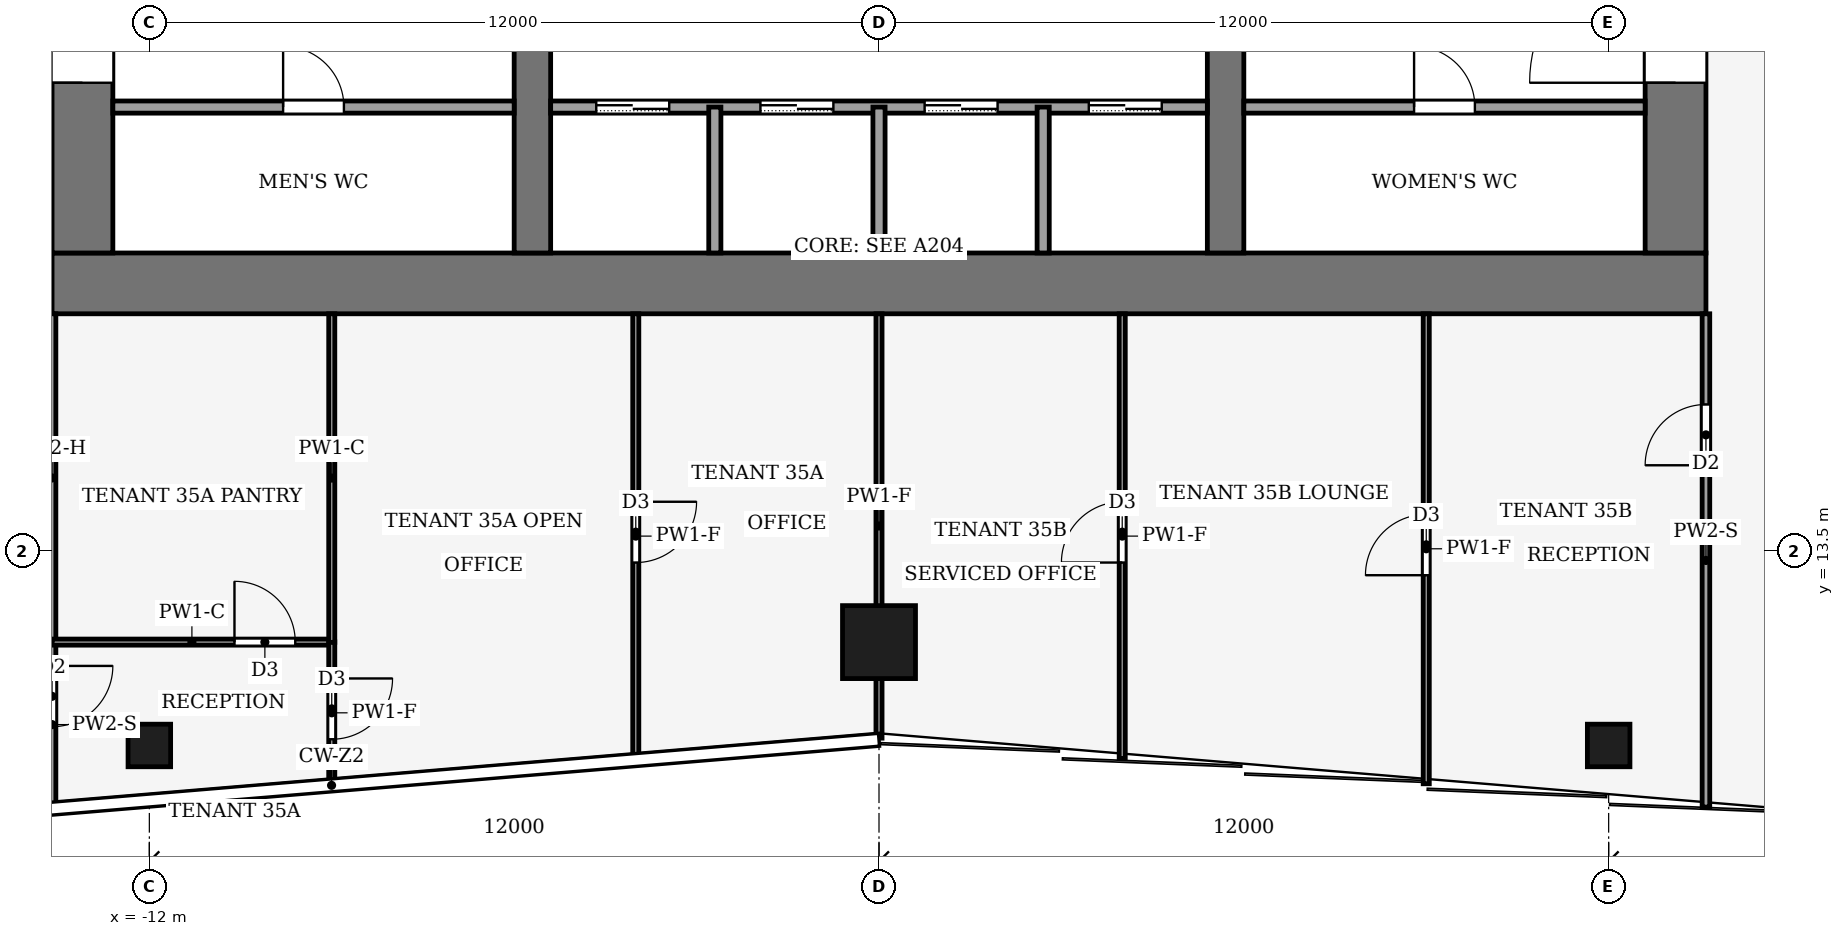
"""IFC4 building model, lengths in metres.
Left out: names, types, materials, properties, quantities, classifications, styles, units other than length and angle.
Written with IfcOpenShell. Run it as: python <this file> out.ifc"""

import sys

from ifc_helpers import new_model, si_unit, direction, frame, frame_2d, origin, origin_2d, place, context, subcontext, project, spatial, rectangle, hollow_rectangle, extrude, element, fill, save


model = new_model("IFC4")
c1 = context("Model", 3, precision=1e-05, world=origin(), true_north=direction((0.0, 1.0)))
c2 = subcontext(c1, "Body", "Model", "MODEL_VIEW")
j1 = project(units=[si_unit("LENGTHUNIT", "METRE"), si_unit("PLANEANGLEUNIT", "RADIAN")], contexts=[c1])
p1 = place(None, origin())
s1 = spatial("IfcSite", under=j1, at=p1, CompositionType="ELEMENT")
p2 = place(p1, origin())
s2 = spatial("IfcBuilding", under=s1, at=p2, CompositionType="ELEMENT")
p3 = place(p2, frame((0.0, 0.0, 154.0)))
s3 = spatial("IfcBuildingStorey", under=s2, at=p3, CompositionType="ELEMENT", Elevation=154.0)
p4 = place(p3, frame((-13.6, 17.9, -0.13), z_axis=(0.0, 0.0, 1.0), x_axis=(1.0, 0.0, 0.0)))
e1 = element("IfcWall", 1, at=p4, inside=s3, PredefinedType="SHEAR", context=c2, shape_type="SweptSolid", body=[
    extrude(rectangle(XDim=27.2, YDim=1.0, at=frame_2d((13.6, 0.0))), origin(), (0.0, 0.0, 1.0), 4.0),
])
p5 = place(p3, frame((-13.1, 18.4, -0.13), z_axis=(0.0, 0.0, 1.0), x_axis=(0.0, 1.0, 0.0)))
e2 = element("IfcWall", 2, at=p5, inside=s3, PredefinedType="SHEAR", context=c2, shape_type="SweptSolid", body=[
    extrude(rectangle(XDim=19.2, YDim=1.0, at=frame_2d((9.6, 0.0))), origin(), (0.0, 0.0, 1.0), 4.0),
])
p6 = place(p5, frame((2.8, 0.0, 0.13)))
e3 = element("IfcOpeningElement", 3, at=p6, cuts=e2, PredefinedType="OPENING", context=c2, shape_type="SweptSolid", body=[
    extrude(rectangle(XDim=2.4, YDim=2.4, at=frame_2d((1.2, 1.2))), frame((0.0, 0.51, 0.0), z_axis=(0.0, -1.0, 0.0), x_axis=(1.0, 0.0, 0.0)), (0.0, 0.0, 1.0), 1.02),
])
p7 = place(p5, frame((13.4, 0.0, 0.13)))
e4 = element("IfcOpeningElement", 4, at=p7, cuts=e2, PredefinedType="OPENING", context=c2, shape_type="SweptSolid", body=[
    extrude(rectangle(XDim=1.4, YDim=2.2, at=frame_2d((0.7, 1.1))), frame((0.0, 0.51, 0.0), z_axis=(0.0, -1.0, 0.0), x_axis=(1.0, 0.0, 0.0)), (0.0, 0.0, 1.0), 1.02),
])
p8 = place(p3, frame((13.1, 18.4, -0.13), z_axis=(0.0, 0.0, 1.0), x_axis=(0.0, 1.0, 0.0)))
e5 = element("IfcWall", 5, at=p8, inside=s3, PredefinedType="SHEAR", context=c2, shape_type="SweptSolid", body=[
    extrude(rectangle(XDim=19.2, YDim=1.0, at=frame_2d((9.6, 0.0))), origin(), (0.0, 0.0, 1.0), 4.0),
])
p9 = place(p8, frame((2.8, 0.0, 0.13)))
e6 = element("IfcOpeningElement", 6, at=p9, cuts=e5, PredefinedType="OPENING", context=c2, shape_type="SweptSolid", body=[
    extrude(rectangle(XDim=2.4, YDim=2.4, at=frame_2d((1.2, 1.2))), frame((0.0, 0.51, 0.0), z_axis=(0.0, -1.0, 0.0), x_axis=(1.0, 0.0, 0.0)), (0.0, 0.0, 1.0), 1.02),
])
p10 = place(p8, frame((13.3, 0.0, 0.13)))
e7 = element("IfcOpeningElement", 7, at=p10, cuts=e5, PredefinedType="OPENING", context=c2, shape_type="SweptSolid", body=[
    extrude(rectangle(XDim=2.4, YDim=2.4, at=frame_2d((1.2, 1.2))), frame((0.0, 0.51, 0.0), z_axis=(0.0, -1.0, 0.0), x_axis=(1.0, 0.0, 0.0)), (0.0, 0.0, 1.0), 1.02),
])
p11 = place(p3, frame((-5.7, 18.4, -0.13), z_axis=(0.0, 0.0, 1.0), x_axis=(0.0, 1.0, 0.0)))
e8 = element("IfcWall", 8, at=p11, inside=s3, PredefinedType="SHEAR", context=c2, shape_type="SweptSolid", body=[
    extrude(rectangle(XDim=19.2, YDim=0.6, at=frame_2d((9.6, 0.0))), origin(), (0.0, 0.0, 1.0), 4.0),
])
p12 = place(p11, frame((8.35, 0.0, 0.13)))
e9 = element("IfcOpeningElement", 9, at=p12, cuts=e8, PredefinedType="OPENING", context=c2, shape_type="SweptSolid", body=[
    extrude(rectangle(XDim=0.9, YDim=2.1, at=frame_2d((0.45, 1.05))), frame((0.0, 0.31, 0.0), z_axis=(0.0, -1.0, 0.0), x_axis=(1.0, 0.0, 0.0)), (0.0, 0.0, 1.0), 0.62),
])
p13 = place(p3, frame((5.7, 18.4, -0.13), z_axis=(0.0, 0.0, 1.0), x_axis=(0.0, 1.0, 0.0)))
e10 = element("IfcWall", 10, at=p13, inside=s3, PredefinedType="SHEAR", context=c2, shape_type="SweptSolid", body=[
    extrude(rectangle(XDim=19.2, YDim=0.6, at=frame_2d((9.6, 0.0))), origin(), (0.0, 0.0, 1.0), 4.0),
])
p14 = place(p13, frame((13.3, 0.0, 0.13)))
e11 = element("IfcOpeningElement", 11, at=p14, cuts=e10, PredefinedType="OPENING", context=c2, shape_type="SweptSolid", body=[
    extrude(rectangle(XDim=2.4, YDim=2.4, at=frame_2d((1.2, 1.2))), frame((0.0, 0.31, 0.0), z_axis=(0.0, -1.0, 0.0), x_axis=(1.0, 0.0, 0.0)), (0.0, 0.0, 1.0), 0.62),
])
p15 = place(p3, frame((0.0, 12.0, 0.0), z_axis=(0.0, 0.0, 1.0), x_axis=(1.0, 0.0, 0.0)))
e12 = element("IfcColumn", 12, at=p15, inside=s3, PredefinedType="COLUMN", context=c2, shape_type="SweptSolid", body=[
    extrude(hollow_rectangle(XDim=1.2, YDim=1.2, WallThickness=0.07, at=origin_2d()), origin(), (0.0, 0.0, 1.0), 4.0),
])
for number, where, z_axis, x_axis in (
    (13, (-12.0, 10.3, 0.0), (0.0, 0.0, 1.0), (1.0, 0.0, 0.0)),
    (14, (12.0, 10.3, 0.0), (0.0, 0.0, 1.0), (1.0, 0.0, 0.0)),
):
    element("IfcColumn", number, at=place(p3, frame(where, z_axis=z_axis, x_axis=x_axis)), inside=s3, PredefinedType="COLUMN", context=c2, shape_type="SweptSolid", body=[
        extrude(hollow_rectangle(XDim=0.7, YDim=0.7, WallThickness=0.03, at=origin_2d()), origin(), (0.0, 0.0, 1.0), 4.0),
    ])
p16 = place(p3, frame((-12.6, 20.8, 0.0), z_axis=(0.0, 0.0, 1.0), x_axis=(1.0, 0.0, 0.0)))
e15 = element("IfcWall", 15, at=p16, inside=s3, PredefinedType="PARTITIONING", context=c2, shape_type="SweptSolid", body=[
    extrude(rectangle(XDim=6.6, YDim=0.2, at=frame_2d((3.3, 0.0))), origin(), (0.0, 0.0, 1.0), 3.87),
])
p17 = place(p16, frame((2.8, 0.0, 0.0)))
e16 = element("IfcOpeningElement", 16, at=p17, cuts=e15, PredefinedType="OPENING", context=c2, shape_type="SweptSolid", body=[
    extrude(rectangle(XDim=1.0, YDim=2.1, at=frame_2d((0.5, 1.05))), frame((0.0, 0.11, 0.0), z_axis=(0.0, -1.0, 0.0), x_axis=(1.0, 0.0, 0.0)), (0.0, 0.0, 1.0), 0.22),
])
p18 = place(p3, frame((-5.4, 20.8, 0.0), z_axis=(0.0, 0.0, 1.0), x_axis=(1.0, 0.0, 0.0)))
e17 = element("IfcWall", 17, at=p18, inside=s3, PredefinedType="PARTITIONING", context=c2, shape_type="SweptSolid", body=[
    extrude(rectangle(XDim=10.8, YDim=0.2, at=frame_2d((5.4, 0.0))), origin(), (0.0, 0.0, 1.0), 3.87),
])
p19 = place(p18, frame((0.75, 0.0, 0.0)))
e18 = element("IfcOpeningElement", 18, at=p19, cuts=e17, PredefinedType="OPENING", context=c2, shape_type="SweptSolid", body=[
    extrude(rectangle(XDim=1.2, YDim=2.2, at=frame_2d((0.6, 1.1))), frame((0.0, 0.11, 0.0), z_axis=(0.0, -1.0, 0.0), x_axis=(1.0, 0.0, 0.0)), (0.0, 0.0, 1.0), 0.22),
])
p20 = place(p18, frame((3.45, 0.0, 0.0)))
e19 = element("IfcOpeningElement", 19, at=p20, cuts=e17, PredefinedType="OPENING", context=c2, shape_type="SweptSolid", body=[
    extrude(rectangle(XDim=1.2, YDim=2.2, at=frame_2d((0.6, 1.1))), frame((0.0, 0.11, 0.0), z_axis=(0.0, -1.0, 0.0), x_axis=(1.0, 0.0, 0.0)), (0.0, 0.0, 1.0), 0.22),
])
p21 = place(p18, frame((6.15, 0.0, 0.0)))
e20 = element("IfcOpeningElement", 20, at=p21, cuts=e17, PredefinedType="OPENING", context=c2, shape_type="SweptSolid", body=[
    extrude(rectangle(XDim=1.2, YDim=2.2, at=frame_2d((0.6, 1.1))), frame((0.0, 0.11, 0.0), z_axis=(0.0, -1.0, 0.0), x_axis=(1.0, 0.0, 0.0)), (0.0, 0.0, 1.0), 0.22),
])
p22 = place(p18, frame((8.85, 0.0, 0.0)))
e21 = element("IfcOpeningElement", 21, at=p22, cuts=e17, PredefinedType="OPENING", context=c2, shape_type="SweptSolid", body=[
    extrude(rectangle(XDim=1.2, YDim=2.2, at=frame_2d((0.6, 1.1))), frame((0.0, 0.11, 0.0), z_axis=(0.0, -1.0, 0.0), x_axis=(1.0, 0.0, 0.0)), (0.0, 0.0, 1.0), 0.22),
])
p23 = place(p3, frame((6.0, 20.8, 0.0), z_axis=(0.0, 0.0, 1.0), x_axis=(1.0, 0.0, 0.0)))
e22 = element("IfcWall", 22, at=p23, inside=s3, PredefinedType="PARTITIONING", context=c2, shape_type="SweptSolid", body=[
    extrude(rectangle(XDim=6.6, YDim=0.2, at=frame_2d((3.3, 0.0))), origin(), (0.0, 0.0, 1.0), 3.87),
])
p24 = place(p23, frame((2.8, 0.0, 0.0)))
e23 = element("IfcOpeningElement", 23, at=p24, cuts=e22, PredefinedType="OPENING", context=c2, shape_type="SweptSolid", body=[
    extrude(rectangle(XDim=1.0, YDim=2.1, at=frame_2d((0.5, 1.05))), frame((0.0, 0.11, 0.0), z_axis=(0.0, -1.0, 0.0), x_axis=(1.0, 0.0, 0.0)), (0.0, 0.0, 1.0), 0.22),
])
for number, where, z_axis, x_axis in (
    (24, (-2.7, 18.4, 0.0), (0.0, 0.0, 1.0), (0.0, 1.0, 0.0)),
    (25, (0.0, 18.4, 0.0), (0.0, 0.0, 1.0), (0.0, 1.0, 0.0)),
    (26, (2.7, 18.4, 0.0), (0.0, 0.0, 1.0), (0.0, 1.0, 0.0)),
):
    element("IfcWall", number, at=place(p3, frame(where, z_axis=z_axis, x_axis=x_axis)), inside=s3, PredefinedType="PARTITIONING", context=c2, shape_type="SweptSolid", body=[
        extrude(rectangle(XDim=2.4, YDim=0.2, at=frame_2d((1.2, 0.0))), origin(), (0.0, 0.0, 1.0), 3.87),
    ])
p25 = place(p3, frame((-13.6, 12.0, 0.0), z_axis=(0.0, 0.0, 1.0), x_axis=(0.0, -1.0, 0.0)))
e27 = element("IfcWall", 27, at=p25, inside=s3, PredefinedType="PARTITIONING", context=c2, shape_type="SweptSolid", body=[
    extrude(rectangle(XDim=2.713, YDim=0.125, at=frame_2d((1.357, 0.0))), origin(), (0.0, 0.0, 1.0), 3.04),
])
p26 = place(p25, frame((0.392, 0.0, 0.0)))
e28 = element("IfcOpeningElement", 28, at=p26, cuts=e27, PredefinedType="OPENING", context=c2, shape_type="SweptSolid", body=[
    extrude(rectangle(XDim=1.0, YDim=2.1, at=frame_2d((0.5, 1.05))), frame((0.0, 0.073, 0.0), z_axis=(0.0, -1.0, 0.0), x_axis=(1.0, 0.0, 0.0)), (0.0, 0.0, 1.0), 0.145),
])
p27 = place(p3, frame((-13.6, 12.0, 0.0), z_axis=(0.0, 0.0, 1.0), x_axis=(0.0, 1.0, 0.0)))
e29 = element("IfcWall", 29, at=p27, inside=s3, PredefinedType="PARTITIONING", context=c2, shape_type="SweptSolid", body=[
    extrude(rectangle(XDim=5.4, YDim=0.125, at=frame_2d((2.7, 0.0))), origin(), (0.0, 0.0, 1.0), 3.14),
])
p28 = place(p3, frame((13.6, 9.287, 0.0), z_axis=(0.0, 0.0, 1.0), x_axis=(0.0, 1.0, 0.0)))
e30 = element("IfcWall", 30, at=p28, inside=s3, PredefinedType="PARTITIONING", context=c2, shape_type="SweptSolid", body=[
    extrude(rectangle(XDim=8.113, YDim=0.125, at=frame_2d((4.057, 0.0))), origin(), (0.0, 0.0, 1.0), 3.04),
])
p29 = place(p28, frame((5.622, 0.0, 0.0)))
e31 = element("IfcOpeningElement", 31, at=p29, cuts=e30, PredefinedType="OPENING", context=c2, shape_type="SweptSolid", body=[
    extrude(rectangle(XDim=1.0, YDim=2.1, at=frame_2d((0.5, 1.05))), frame((0.0, 0.073, 0.0), z_axis=(0.0, -1.0, 0.0), x_axis=(1.0, 0.0, 0.0)), (0.0, 0.0, 1.0), 0.145),
])
p30 = place(p3, frame((-13.6, 12.0, 0.0), z_axis=(0.0, 0.0, 1.0), x_axis=(1.0, 0.0, 0.0)))
e32 = element("IfcWall", 32, at=p30, inside=s3, PredefinedType="PARTITIONING", context=c2, shape_type="SweptSolid", body=[
    extrude(rectangle(XDim=4.6, YDim=0.1, at=frame_2d((2.3, 0.0))), origin(), (0.0, 0.0, 1.0), 3.87),
])
p31 = place(p30, frame((3.0, 0.0, 0.0)))
e33 = element("IfcOpeningElement", 33, at=p31, cuts=e32, PredefinedType="OPENING", context=c2, shape_type="SweptSolid", body=[
    extrude(rectangle(XDim=1.0, YDim=2.1, at=frame_2d((0.5, 1.05))), frame((0.0, 0.06, 0.0), z_axis=(0.0, -1.0, 0.0), x_axis=(1.0, 0.0, 0.0)), (0.0, 0.0, 1.0), 0.12),
])
p32 = place(p3, frame((-9.0, 12.004, 0.0), z_axis=(0.0, 0.0, 1.0), x_axis=(0.0, -1.0, 0.0)))
e34 = element("IfcWall", 34, at=p32, inside=s3, PredefinedType="PARTITIONING", context=c2, shape_type="SweptSolid", body=[
    extrude(rectangle(XDim=2.334, YDim=0.1, at=frame_2d((1.167, 0.0))), origin(), (0.0, 0.0, 1.0), 3.04),
])
p33 = place(p32, frame((0.602, 0.0, 0.0)))
e35 = element("IfcOpeningElement", 35, at=p33, cuts=e34, PredefinedType="OPENING", context=c2, shape_type="SweptSolid", body=[
    extrude(rectangle(XDim=1.0, YDim=2.1, at=frame_2d((0.5, 1.05))), frame((0.0, 0.06, 0.0), z_axis=(0.0, -1.0, 0.0), x_axis=(1.0, 0.0, 0.0)), (0.0, 0.0, 1.0), 0.12),
])
p34 = place(p3, frame((-9.0, 11.996, 0.0), z_axis=(0.0, 0.0, 1.0), x_axis=(0.0, 1.0, 0.0)))
e36 = element("IfcWall", 36, at=p34, inside=s3, PredefinedType="PARTITIONING", context=c2, shape_type="SweptSolid", body=[
    extrude(rectangle(XDim=5.404, YDim=0.1, at=frame_2d((2.702, 0.0))), origin(), (0.0, 0.0, 1.0), 3.87),
])
p35 = place(p3, frame((-4.0, 17.4, 0.0), z_axis=(0.0, 0.0, 1.0), x_axis=(0.0, -1.0, 0.0)))
e37 = element("IfcWall", 37, at=p35, inside=s3, PredefinedType="PARTITIONING", context=c2, shape_type="SweptSolid", body=[
    extrude(rectangle(XDim=7.313, YDim=0.1, at=frame_2d((3.657, 0.0))), origin(), (0.0, 0.0, 1.0), 3.04),
])
p36 = place(p35, frame((3.092, 0.0, 0.0)))
e38 = element("IfcOpeningElement", 38, at=p36, cuts=e37, PredefinedType="OPENING", context=c2, shape_type="SweptSolid", body=[
    extrude(rectangle(XDim=1.0, YDim=2.1, at=frame_2d((0.5, 1.05))), frame((0.0, 0.06, 0.0), z_axis=(0.0, -1.0, 0.0), x_axis=(1.0, 0.0, 0.0)), (0.0, 0.0, 1.0), 0.12),
])
p37 = place(p3, frame((0.0, 10.42, 0.0), z_axis=(0.0, 0.0, 1.0), x_axis=(0.0, 1.0, 0.0)))
e39 = element("IfcWall", 39, at=p37, inside=s3, PredefinedType="PARTITIONING", context=c2, shape_type="SweptSolid", body=[
    extrude(rectangle(XDim=6.98, YDim=0.1, at=frame_2d((3.49, 0.0))), origin(), (0.0, 0.0, 1.0), 3.04),
])
p38 = place(p3, frame((9.0, 9.67, 0.0), z_axis=(0.0, 0.0, 1.0), x_axis=(0.0, 1.0, 0.0)))
e40 = element("IfcWall", 40, at=p38, inside=s3, PredefinedType="PARTITIONING", context=c2, shape_type="SweptSolid", body=[
    extrude(rectangle(XDim=7.73, YDim=0.1, at=frame_2d((3.865, 0.0))), origin(), (0.0, 0.0, 1.0), 3.04),
])
p39 = place(p38, frame((3.43, 0.0, 0.0)))
e41 = element("IfcOpeningElement", 41, at=p39, cuts=e40, PredefinedType="OPENING", context=c2, shape_type="SweptSolid", body=[
    extrude(rectangle(XDim=1.0, YDim=2.1, at=frame_2d((0.5, 1.05))), frame((0.0, 0.06, 0.0), z_axis=(0.0, -1.0, 0.0), x_axis=(1.0, 0.0, 0.0)), (0.0, 0.0, 1.0), 0.12),
])
p40 = place(p3, frame((4.0, 10.087, 0.0), z_axis=(0.0, 0.0, 1.0), x_axis=(0.0, 1.0, 0.0)))
e42 = element("IfcWall", 42, at=p40, inside=s3, PredefinedType="PARTITIONING", context=c2, shape_type="SweptSolid", body=[
    extrude(rectangle(XDim=7.313, YDim=0.1, at=frame_2d((3.657, 0.0))), origin(), (0.0, 0.0, 1.0), 3.04),
])
p41 = place(p40, frame((3.222, 0.0, 0.0)))
e43 = element("IfcOpeningElement", 43, at=p41, cuts=e42, PredefinedType="OPENING", context=c2, shape_type="SweptSolid", body=[
    extrude(rectangle(XDim=1.0, YDim=2.1, at=frame_2d((0.5, 1.05))), frame((0.0, 0.06, 0.0), z_axis=(0.0, -1.0, 0.0), x_axis=(1.0, 0.0, 0.0)), (0.0, 0.0, 1.0), 0.12),
])
p42 = place(p19, origin())
e44 = element("IfcDoor", 44, at=p42, inside=s3, OperationType="SLIDING_TO_LEFT", PredefinedType="DOOR", context=c2, shape_type="SweptSolid", body=[
    extrude(rectangle(XDim=1.2, YDim=2.2, at=frame_2d((0.6, 1.1))), frame((0.0, 0.025, 0.0), z_axis=(0.0, -1.0, 0.0), x_axis=(1.0, 0.0, 0.0)), (0.0, 0.0, 1.0), 0.05),
])
fill(e18, e44)
p43 = place(p20, origin())
e45 = element("IfcDoor", 45, at=p43, inside=s3, OperationType="SLIDING_TO_LEFT", PredefinedType="DOOR", context=c2, shape_type="SweptSolid", body=[
    extrude(rectangle(XDim=1.2, YDim=2.2, at=frame_2d((0.6, 1.1))), frame((0.0, 0.025, 0.0), z_axis=(0.0, -1.0, 0.0), x_axis=(1.0, 0.0, 0.0)), (0.0, 0.0, 1.0), 0.05),
])
fill(e19, e45)
p44 = place(p21, origin())
e46 = element("IfcDoor", 46, at=p44, inside=s3, OperationType="SLIDING_TO_LEFT", PredefinedType="DOOR", context=c2, shape_type="SweptSolid", body=[
    extrude(rectangle(XDim=1.2, YDim=2.2, at=frame_2d((0.6, 1.1))), frame((0.0, 0.025, 0.0), z_axis=(0.0, -1.0, 0.0), x_axis=(1.0, 0.0, 0.0)), (0.0, 0.0, 1.0), 0.05),
])
fill(e20, e46)
p45 = place(p22, origin())
e47 = element("IfcDoor", 47, at=p45, inside=s3, OperationType="SLIDING_TO_LEFT", PredefinedType="DOOR", context=c2, shape_type="SweptSolid", body=[
    extrude(rectangle(XDim=1.2, YDim=2.2, at=frame_2d((0.6, 1.1))), frame((0.0, 0.025, 0.0), z_axis=(0.0, -1.0, 0.0), x_axis=(1.0, 0.0, 0.0)), (0.0, 0.0, 1.0), 0.05),
])
fill(e21, e47)
p46 = place(p17, origin())
e48 = element("IfcDoor", 48, at=p46, inside=s3, OperationType="SINGLE_SWING_LEFT", PredefinedType="DOOR", context=c2, shape_type="SweptSolid", body=[
    extrude(rectangle(XDim=1.0, YDim=2.1, at=frame_2d((0.5, 1.05))), frame((0.0, 0.025, 0.0), z_axis=(0.0, -1.0, 0.0), x_axis=(1.0, 0.0, 0.0)), (0.0, 0.0, 1.0), 0.05),
])
fill(e16, e48)
p47 = place(p24, origin())
e49 = element("IfcDoor", 49, at=p47, inside=s3, OperationType="SINGLE_SWING_RIGHT", PredefinedType="DOOR", context=c2, shape_type="SweptSolid", body=[
    extrude(rectangle(XDim=1.0, YDim=2.1, at=frame_2d((0.5, 1.05))), frame((0.0, 0.025, 0.0), z_axis=(0.0, -1.0, 0.0), x_axis=(1.0, 0.0, 0.0)), (0.0, 0.0, 1.0), 0.05),
])
fill(e23, e49)
p48 = place(p6, origin())
e50 = element("IfcDoor", 50, at=p48, inside=s3, OperationType="DOUBLE_DOOR_SINGLE_SWING", PredefinedType="DOOR", context=c2, shape_type="SweptSolid", body=[
    extrude(rectangle(XDim=2.4, YDim=2.4, at=frame_2d((1.2, 1.2))), frame((0.0, 0.025, 0.0), z_axis=(0.0, -1.0, 0.0), x_axis=(1.0, 0.0, 0.0)), (0.0, 0.0, 1.0), 0.05),
])
fill(e3, e50)
p49 = place(p9, origin())
e51 = element("IfcDoor", 51, at=p49, inside=s3, OperationType="DOUBLE_DOOR_SINGLE_SWING", PredefinedType="DOOR", context=c2, shape_type="SweptSolid", body=[
    extrude(rectangle(XDim=2.4, YDim=2.4, at=frame_2d((1.2, 1.2))), frame((0.0, 0.025, 0.0), z_axis=(0.0, -1.0, 0.0), x_axis=(1.0, 0.0, 0.0)), (0.0, 0.0, 1.0), 0.05),
])
fill(e6, e51)
p50 = place(p26, origin())
e52 = element("IfcDoor", 52, at=p50, inside=s3, OperationType="SINGLE_SWING_LEFT", PredefinedType="DOOR", context=c2, shape_type="SweptSolid", body=[
    extrude(rectangle(XDim=1.0, YDim=2.1, at=frame_2d((0.5, 1.05))), frame((0.0, 0.025, 0.0), z_axis=(0.0, -1.0, 0.0), x_axis=(1.0, 0.0, 0.0)), (0.0, 0.0, 1.0), 0.05),
])
fill(e28, e52)
p51 = place(p29, origin())
e53 = element("IfcDoor", 53, at=p51, inside=s3, OperationType="SINGLE_SWING_RIGHT", PredefinedType="DOOR", context=c2, shape_type="SweptSolid", body=[
    extrude(rectangle(XDim=1.0, YDim=2.1, at=frame_2d((0.5, 1.05))), frame((0.0, 0.025, 0.0), z_axis=(0.0, -1.0, 0.0), x_axis=(1.0, 0.0, 0.0)), (0.0, 0.0, 1.0), 0.05),
])
fill(e31, e53)
p52 = place(p31, origin())
e54 = element("IfcDoor", 54, at=p52, inside=s3, OperationType="SINGLE_SWING_RIGHT", PredefinedType="DOOR", context=c2, shape_type="SweptSolid", body=[
    extrude(rectangle(XDim=1.0, YDim=2.1, at=frame_2d((0.5, 1.05))), frame((0.0, 0.025, 0.0), z_axis=(0.0, -1.0, 0.0), x_axis=(1.0, 0.0, 0.0)), (0.0, 0.0, 1.0), 0.05),
])
fill(e33, e54)
p53 = place(p33, origin())
e55 = element("IfcDoor", 55, at=p53, inside=s3, OperationType="SINGLE_SWING_LEFT", PredefinedType="DOOR", context=c2, shape_type="SweptSolid", body=[
    extrude(rectangle(XDim=1.0, YDim=2.1, at=frame_2d((0.5, 1.05))), frame((0.0, 0.025, 0.0), z_axis=(0.0, -1.0, 0.0), x_axis=(1.0, 0.0, 0.0)), (0.0, 0.0, 1.0), 0.05),
])
fill(e35, e55)
p54 = place(p36, origin())
e56 = element("IfcDoor", 56, at=p54, inside=s3, OperationType="SINGLE_SWING_LEFT", PredefinedType="DOOR", context=c2, shape_type="SweptSolid", body=[
    extrude(rectangle(XDim=1.0, YDim=2.1, at=frame_2d((0.5, 1.05))), frame((0.0, 0.025, 0.0), z_axis=(0.0, -1.0, 0.0), x_axis=(1.0, 0.0, 0.0)), (0.0, 0.0, 1.0), 0.05),
])
fill(e38, e56)
p55 = place(p39, origin())
e57 = element("IfcDoor", 57, at=p55, inside=s3, OperationType="SINGLE_SWING_RIGHT", PredefinedType="DOOR", context=c2, shape_type="SweptSolid", body=[
    extrude(rectangle(XDim=1.0, YDim=2.1, at=frame_2d((0.5, 1.05))), frame((0.0, 0.025, 0.0), z_axis=(0.0, -1.0, 0.0), x_axis=(1.0, 0.0, 0.0)), (0.0, 0.0, 1.0), 0.05),
])
fill(e41, e57)
p56 = place(p41, origin())
e58 = element("IfcDoor", 58, at=p56, inside=s3, OperationType="SINGLE_SWING_RIGHT", PredefinedType="DOOR", context=c2, shape_type="SweptSolid", body=[
    extrude(rectangle(XDim=1.0, YDim=2.1, at=frame_2d((0.5, 1.05))), frame((0.0, 0.025, 0.0), z_axis=(0.0, -1.0, 0.0), x_axis=(1.0, 0.0, 0.0)), (0.0, 0.0, 1.0), 0.05),
])
fill(e43, e58)
save(model, sys.argv[1])
